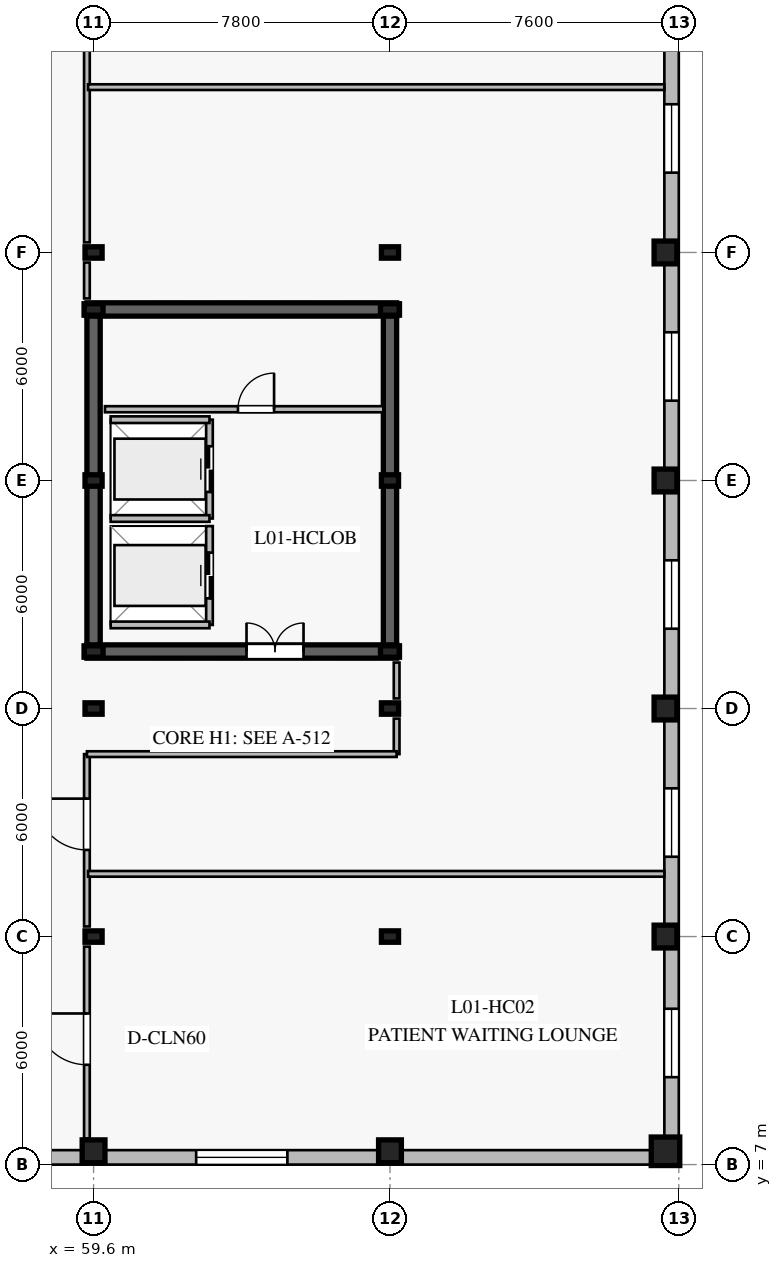
"""IFC4 building model, lengths in metres.
Left out: names, types, materials, properties, quantities, classifications, styles, units other than length and angle.
Written with IfcOpenShell. Run it as: python <this file> out.ifc"""

import sys

from ifc_helpers import new_model, si_unit, direction, frame, frame_2d, origin, origin_2d, place, context, subcontext, project, spatial, rectangle, i_section, extrude, element, fill, save


model = new_model("IFC4")
c1 = context("Model", 3, precision=1e-05, world=origin(), true_north=direction((0.0, 1.0)))
c2 = subcontext(c1, "Body", "Model", "MODEL_VIEW")
j1 = project(units=[si_unit("LENGTHUNIT", "METRE"), si_unit("PLANEANGLEUNIT", "RADIAN")], contexts=[c1])
p1 = place(None, origin())
s1 = spatial("IfcSite", under=j1, at=p1, CompositionType="ELEMENT")
p2 = place(p1, origin())
s2 = spatial("IfcBuilding", under=s1, at=p2, CompositionType="ELEMENT")
p3 = place(p2, frame((0.0, 0.0, 5.2)))
s3 = spatial("IfcBuildingStorey", under=s2, at=p3, CompositionType="ELEMENT", Elevation=5.2)
p4 = place(p3, frame((59.425, 20.5, 0.0), z_axis=(0.0, 0.0, 1.0), x_axis=(1.0, 0.0, 0.0)))
e1 = element("IfcWall", 1, at=p4, inside=s3, PredefinedType="SHEAR", context=c2, shape_type="SweptSolid", body=[
    extrude(rectangle(XDim=8.15, YDim=0.35, at=frame_2d((4.075, 0.0))), origin(), (0.0, 0.0, 1.0), 4.34),
])
p5 = place(p4, frame((4.2, 0.0, 0.0)))
e2 = element("IfcOpeningElement", 2, at=p5, cuts=e1, PredefinedType="OPENING", context=c2, shape_type="SweptSolid", body=[
    extrude(rectangle(XDim=1.5, YDim=2.2, at=frame_2d((0.75, 1.1))), frame((0.0, 0.185, 0.0), z_axis=(0.0, -1.0, 0.0), x_axis=(1.0, 0.0, 0.0)), (0.0, 0.0, 1.0), 0.37),
])
p6 = place(p3, frame((67.575, 29.5, 0.0), z_axis=(0.0, 0.0, 1.0), x_axis=(-1.0, 0.0, 0.0)))
e3 = element("IfcWall", 3, at=p6, inside=s3, PredefinedType="SHEAR", context=c2, shape_type="SweptSolid", body=[
    extrude(rectangle(XDim=8.15, YDim=0.35, at=frame_2d((4.075, 0.0))), origin(), (0.0, 0.0, 1.0), 4.34),
])
for number, where, z_axis, x_axis in (
    (4, (59.6, 29.325, 0.0), (0.0, 0.0, 1.0), (0.0, -1.0, 0.0)),
    (5, (67.4, 20.675, 0.0), (0.0, 0.0, 1.0), (0.0, 1.0, 0.0)),
):
    element("IfcWall", number, at=place(p3, frame(where, z_axis=z_axis, x_axis=x_axis)), inside=s3, PredefinedType="SHEAR", context=c2, shape_type="SweptSolid", body=[
        extrude(rectangle(XDim=8.65, YDim=0.35, at=frame_2d((4.325, 0.0))), origin(), (0.0, 0.0, 1.0), 4.34),
    ])
for number, where, z_axis, x_axis in (
    (6, (59.6, 20.5, 0.0), (0.0, 0.0, 1.0), (1.0, 0.0, 0.0)),
    (7, (67.4, 20.5, 0.0), (0.0, 0.0, 1.0), (1.0, 0.0, 0.0)),
    (8, (67.4, 29.5, 0.0), (0.0, 0.0, 1.0), (1.0, 0.0, 0.0)),
    (9, (59.6, 29.5, 0.0), (0.0, 0.0, 1.0), (1.0, 0.0, 0.0)),
):
    element("IfcColumn", number, at=place(p3, frame(where, z_axis=z_axis, x_axis=x_axis)), inside=s3, PredefinedType="COLUMN", context=c2, shape_type="SweptSolid", body=[
        extrude(i_section(OverallWidth=0.3, OverallDepth=0.5, WebThickness=0.014, FlangeThickness=0.028, at=origin_2d()), origin(), (0.0, 0.0, 1.0), 4.6),
    ])
p7 = place(p3, frame((59.6, 7.35, 0.0), z_axis=(0.0, 0.0, 1.0), x_axis=(1.0, 0.0, 0.0)))
e10 = element("IfcColumn", 10, at=p7, inside=s3, PredefinedType="COLUMN", context=c2, shape_type="SweptSolid", body=[
    extrude(rectangle(XDim=0.6, YDim=0.6, at=origin_2d()), origin(), (0.0, 0.0, 1.0), 4.6),
])
for number, where, z_axis, x_axis in (
    (11, (59.6, 13.0, 0.0), (0.0, 0.0, 1.0), (1.0, 0.0, 0.0)),
    (12, (59.6, 19.0, 0.0), (0.0, 0.0, 1.0), (1.0, 0.0, 0.0)),
    (13, (59.6, 25.0, 0.0), (0.0, 0.0, 1.0), (1.0, 0.0, 0.0)),
    (14, (59.6, 31.0, 0.0), (0.0, 0.0, 1.0), (1.0, 0.0, 0.0)),
):
    element("IfcColumn", number, at=place(p3, frame(where, z_axis=z_axis, x_axis=x_axis)), inside=s3, PredefinedType="COLUMN", context=c2, shape_type="SweptSolid", body=[
        extrude(i_section(OverallWidth=0.3, OverallDepth=0.45, WebThickness=0.014, FlangeThickness=0.026, at=origin_2d()), origin(), (0.0, 0.0, 1.0), 4.6),
    ])
p8 = place(p3, frame((67.4, 7.35, 0.0), z_axis=(0.0, 0.0, 1.0), x_axis=(1.0, 0.0, 0.0)))
e15 = element("IfcColumn", 15, at=p8, inside=s3, PredefinedType="COLUMN", context=c2, shape_type="SweptSolid", body=[
    extrude(rectangle(XDim=0.6, YDim=0.6, at=origin_2d()), origin(), (0.0, 0.0, 1.0), 4.6),
])
for number, where, z_axis, x_axis in (
    (16, (67.4, 13.0, 0.0), (0.0, 0.0, 1.0), (1.0, 0.0, 0.0)),
    (17, (67.4, 19.0, 0.0), (0.0, 0.0, 1.0), (1.0, 0.0, 0.0)),
    (18, (67.4, 25.0, 0.0), (0.0, 0.0, 1.0), (1.0, 0.0, 0.0)),
    (19, (67.4, 31.0, 0.0), (0.0, 0.0, 1.0), (1.0, 0.0, 0.0)),
):
    element("IfcColumn", number, at=place(p3, frame(where, z_axis=z_axis, x_axis=x_axis)), inside=s3, PredefinedType="COLUMN", context=c2, shape_type="SweptSolid", body=[
        extrude(i_section(OverallWidth=0.3, OverallDepth=0.45, WebThickness=0.014, FlangeThickness=0.026, at=origin_2d()), origin(), (0.0, 0.0, 1.0), 4.6),
    ])
p9 = place(p3, frame((74.65, 7.35, 0.0), z_axis=(0.0, 0.0, 1.0), x_axis=(1.0, 0.0, 0.0)))
e20 = element("IfcColumn", 20, at=p9, inside=s3, PredefinedType="COLUMN", context=c2, shape_type="SweptSolid", body=[
    extrude(rectangle(XDim=0.75, YDim=0.75, at=origin_2d()), origin(), (0.0, 0.0, 1.0), 4.6),
])
for number, where, z_axis, x_axis in (
    (21, (74.65, 13.0, 0.0), (0.0, 0.0, 1.0), (1.0, 0.0, 0.0)),
    (22, (74.65, 19.0, 0.0), (0.0, 0.0, 1.0), (1.0, 0.0, 0.0)),
    (23, (74.65, 25.0, 0.0), (0.0, 0.0, 1.0), (1.0, 0.0, 0.0)),
    (24, (74.65, 31.0, 0.0), (0.0, 0.0, 1.0), (1.0, 0.0, 0.0)),
):
    element("IfcColumn", number, at=place(p3, frame(where, z_axis=z_axis, x_axis=x_axis)), inside=s3, PredefinedType="COLUMN", context=c2, shape_type="SweptSolid", body=[
        extrude(rectangle(XDim=0.6, YDim=0.6, at=origin_2d()), origin(), (0.0, 0.0, 1.0), 4.6),
    ])
p10 = place(p3, frame((75.0, 7.19, 0.0), z_axis=(0.0, 0.0, 1.0), x_axis=(-1.0, 0.0, 0.0)))
e25 = element("IfcWall", 25, at=p10, inside=s3, PredefinedType="STANDARD", context=c2, shape_type="SweptSolid", body=[
    extrude(rectangle(XDim=23.0, YDim=0.38, at=frame_2d((11.5, 0.0))), origin(), (0.0, 0.0, 1.0), 4.34),
])
p11 = place(p10, frame((10.3, 0.0, 0.95)))
e26 = element("IfcOpeningElement", 26, at=p11, cuts=e25, PredefinedType="OPENING", context=c2, shape_type="SweptSolid", body=[
    extrude(rectangle(XDim=2.4, YDim=1.8, at=frame_2d((1.2, 0.9))), frame((0.0, 0.2, 0.0), z_axis=(0.0, -1.0, 0.0), x_axis=(1.0, 0.0, 0.0)), (0.0, 0.0, 1.0), 0.4),
])
p12 = place(p3, frame((74.81, 42.62, 0.0), z_axis=(0.0, 0.0, 1.0), x_axis=(0.0, -1.0, 0.0)))
e27 = element("IfcWall", 27, at=p12, inside=s3, PredefinedType="STANDARD", context=c2, shape_type="SweptSolid", body=[
    extrude(rectangle(XDim=35.24, YDim=0.38, at=frame_2d((17.62, 0.0))), origin(), (0.0, 0.0, 1.0), 4.34),
])
p13 = place(p12, frame((31.52, 0.0, 0.9)))
e28 = element("IfcOpeningElement", 28, at=p13, cuts=e27, PredefinedType="OPENING", context=c2, shape_type="SweptSolid", body=[
    extrude(rectangle(XDim=1.8, YDim=1.8, at=frame_2d((0.9, 0.9))), frame((0.0, 0.2, 0.0), z_axis=(0.0, -1.0, 0.0), x_axis=(1.0, 0.0, 0.0)), (0.0, 0.0, 1.0), 0.4),
])
p14 = place(p12, frame((25.72, 0.0, 0.9)))
e29 = element("IfcOpeningElement", 29, at=p14, cuts=e27, PredefinedType="OPENING", context=c2, shape_type="SweptSolid", body=[
    extrude(rectangle(XDim=1.8, YDim=1.8, at=frame_2d((0.9, 0.9))), frame((0.0, 0.2, 0.0), z_axis=(0.0, -1.0, 0.0), x_axis=(1.0, 0.0, 0.0)), (0.0, 0.0, 1.0), 0.4),
])
p15 = place(p12, frame((19.72, 0.0, 0.9)))
e30 = element("IfcOpeningElement", 30, at=p15, cuts=e27, PredefinedType="OPENING", context=c2, shape_type="SweptSolid", body=[
    extrude(rectangle(XDim=1.8, YDim=1.8, at=frame_2d((0.9, 0.9))), frame((0.0, 0.2, 0.0), z_axis=(0.0, -1.0, 0.0), x_axis=(1.0, 0.0, 0.0)), (0.0, 0.0, 1.0), 0.4),
])
p16 = place(p12, frame((13.72, 0.0, 0.9)))
e31 = element("IfcOpeningElement", 31, at=p16, cuts=e27, PredefinedType="OPENING", context=c2, shape_type="SweptSolid", body=[
    extrude(rectangle(XDim=1.8, YDim=1.8, at=frame_2d((0.9, 0.9))), frame((0.0, 0.2, 0.0), z_axis=(0.0, -1.0, 0.0), x_axis=(1.0, 0.0, 0.0)), (0.0, 0.0, 1.0), 0.4),
])
p17 = place(p12, frame((7.72, 0.0, 0.9)))
e32 = element("IfcOpeningElement", 32, at=p17, cuts=e27, PredefinedType="OPENING", context=c2, shape_type="SweptSolid", body=[
    extrude(rectangle(XDim=1.8, YDim=1.8, at=frame_2d((0.9, 0.9))), frame((0.0, 0.2, 0.0), z_axis=(0.0, -1.0, 0.0), x_axis=(1.0, 0.0, 0.0)), (0.0, 0.0, 1.0), 0.4),
])
p18 = place(p12, frame((1.92, 0.0, 0.9)))
e33 = element("IfcOpeningElement", 33, at=p18, cuts=e27, PredefinedType="OPENING", context=c2, shape_type="SweptSolid", body=[
    extrude(rectangle(XDim=1.8, YDim=1.8, at=frame_2d((0.9, 0.9))), frame((0.0, 0.2, 0.0), z_axis=(0.0, -1.0, 0.0), x_axis=(1.0, 0.0, 0.0)), (0.0, 0.0, 1.0), 0.4),
])
p19 = place(p3, frame((62.65, 21.2, 0.0), z_axis=(0.0, 0.0, 1.0), x_axis=(0.0, 1.0, 0.0)))
e34 = element("IfcWall", 34, at=p19, inside=s3, PredefinedType="PARTITIONING", context=c2, shape_type="SweptSolid", body=[
    extrude(rectangle(XDim=2.6, YDim=0.175, at=frame_2d((1.3, 0.0))), origin(), (0.0, 0.0, 1.0), 4.34),
])
p20 = place(p19, frame((0.7, 0.0, 0.0)))
e35 = element("IfcOpeningElement", 35, at=p20, cuts=e34, PredefinedType="OPENING", context=c2, shape_type="SweptSolid", body=[
    extrude(rectangle(XDim=1.2, YDim=2.2, at=frame_2d((0.6, 1.1))), frame((0.0, 0.098, 0.0), z_axis=(0.0, -1.0, 0.0), x_axis=(1.0, 0.0, 0.0)), (0.0, 0.0, 1.0), 0.195),
])
p21 = place(p3, frame((60.05, 21.2, 0.0), z_axis=(0.0, 0.0, 1.0), x_axis=(1.0, 0.0, 0.0)))
e36 = element("IfcWall", 36, at=p21, inside=s3, PredefinedType="PARTITIONING", context=c2, shape_type="SweptSolid", body=[
    extrude(rectangle(XDim=2.6, YDim=0.175, at=frame_2d((1.3, 0.0))), origin(), (0.0, 0.0, 1.0), 4.34),
])
p22 = place(p3, frame((62.65, 24.0, 0.0), z_axis=(0.0, 0.0, 1.0), x_axis=(0.0, 1.0, 0.0)))
e37 = element("IfcWall", 37, at=p22, inside=s3, PredefinedType="PARTITIONING", context=c2, shape_type="SweptSolid", body=[
    extrude(rectangle(XDim=2.6, YDim=0.175, at=frame_2d((1.3, 0.0))), origin(), (0.0, 0.0, 1.0), 3.98),
])
p23 = place(p22, frame((0.7, 0.0, 0.0)))
e38 = element("IfcOpeningElement", 38, at=p23, cuts=e37, PredefinedType="OPENING", context=c2, shape_type="SweptSolid", body=[
    extrude(rectangle(XDim=1.2, YDim=2.2, at=frame_2d((0.6, 1.1))), frame((0.0, 0.098, 0.0), z_axis=(0.0, -1.0, 0.0), x_axis=(1.0, 0.0, 0.0)), (0.0, 0.0, 1.0), 0.195),
])
for number, where, z_axis, x_axis in (
    (39, (60.05, 24.0, 0.0), (0.0, 0.0, 1.0), (1.0, 0.0, 0.0)),
    (40, (60.05, 26.6, 0.0), (0.0, 0.0, 1.0), (1.0, 0.0, 0.0)),
):
    element("IfcWall", number, at=place(p3, frame(where, z_axis=z_axis, x_axis=x_axis)), inside=s3, PredefinedType="PARTITIONING", context=c2, shape_type="SweptSolid", body=[
        extrude(rectangle(XDim=2.6, YDim=0.175, at=frame_2d((1.3, 0.0))), origin(), (0.0, 0.0, 1.0), 4.34),
    ])
p24 = place(p3, frame((59.9, 26.875, 0.0), z_axis=(0.0, 0.0, 1.0), x_axis=(1.0, 0.0, 0.0)))
e41 = element("IfcWall", 41, at=p24, inside=s3, PredefinedType="PLUMBINGWALL", context=c2, shape_type="SweptSolid", body=[
    extrude(rectangle(XDim=7.325, YDim=0.16, at=frame_2d((3.663, 0.0))), origin(), (0.0, 0.0, 1.0), 3.98),
])
p25 = place(p24, frame((3.5, 0.0, 0.0)))
e42 = element("IfcOpeningElement", 42, at=p25, cuts=e41, PredefinedType="OPENING", context=c2, shape_type="SweptSolid", body=[
    extrude(rectangle(XDim=0.95, YDim=2.1, at=frame_2d((0.475, 1.05))), frame((0.0, 0.09, 0.0), z_axis=(0.0, -1.0, 0.0), x_axis=(1.0, 0.0, 0.0)), (0.0, 0.0, 1.0), 0.18),
])
p26 = place(p3, frame((59.425, 7.69, 0.0), z_axis=(0.0, 0.0, 1.0), x_axis=(0.0, 1.0, 0.0)))
e43 = element("IfcWall", 43, at=p26, inside=s3, PredefinedType="PARTITIONING", context=c2, shape_type="SweptSolid", body=[
    extrude(rectangle(XDim=5.045, YDim=0.15, at=frame_2d((2.522, 0.0))), origin(), (0.0, 0.0, 1.0), 3.98),
])
p27 = place(p26, frame((1.936, 0.0, 0.0)))
e44 = element("IfcOpeningElement", 44, at=p27, cuts=e43, PredefinedType="OPENING", context=c2, shape_type="SweptSolid", body=[
    extrude(rectangle(XDim=1.35, YDim=2.2, at=frame_2d((0.675, 1.1))), frame((0.0, 0.085, 0.0), z_axis=(0.0, -1.0, 0.0), x_axis=(1.0, 0.0, 0.0)), (0.0, 0.0, 1.0), 0.17),
])
p28 = place(p3, frame((59.425, 13.265, 0.0), z_axis=(0.0, 0.0, 1.0), x_axis=(0.0, 1.0, 0.0)))
e45 = element("IfcWall", 45, at=p28, inside=s3, PredefinedType="PARTITIONING", context=c2, shape_type="SweptSolid", body=[
    extrude(rectangle(XDim=4.535, YDim=0.15, at=frame_2d((2.268, 0.0))), origin(), (0.0, 0.0, 1.0), 3.98),
])
p29 = place(p28, frame((2.014, 0.0, 0.0)))
e46 = element("IfcOpeningElement", 46, at=p29, cuts=e45, PredefinedType="OPENING", context=c2, shape_type="SweptSolid", body=[
    extrude(rectangle(XDim=1.35, YDim=2.2, at=frame_2d((0.675, 1.1))), frame((0.0, 0.085, 0.0), z_axis=(0.0, -1.0, 0.0), x_axis=(1.0, 0.0, 0.0)), (0.0, 0.0, 1.0), 0.17),
])
p30 = place(p3, frame((59.425, 29.79, 0.0), z_axis=(0.0, 0.0, 1.0), x_axis=(0.0, 1.0, 0.0)))
e47 = element("IfcWall", 47, at=p30, inside=s3, PredefinedType="PARTITIONING", context=c2, shape_type="SweptSolid", body=[
    extrude(rectangle(XDim=0.945, YDim=0.15, at=frame_2d((0.473, 0.0))), origin(), (0.0, 0.0, 1.0), 3.98),
])
p31 = place(p3, frame((59.425, 31.265, 0.0), z_axis=(0.0, 0.0, 1.0), x_axis=(0.0, 1.0, 0.0)))
e48 = element("IfcWall", 48, at=p31, inside=s3, PredefinedType="PARTITIONING", context=c2, shape_type="SweptSolid", body=[
    extrude(rectangle(XDim=5.47, YDim=0.15, at=frame_2d((2.735, 0.0))), origin(), (0.0, 0.0, 1.0), 3.98),
])
p32 = place(p3, frame((67.575, 17.8, 0.0), z_axis=(0.0, 0.0, 1.0), x_axis=(0.0, 1.0, 0.0)))
e49 = element("IfcWall", 49, at=p32, inside=s3, PredefinedType="PARTITIONING", context=c2, shape_type="SweptSolid", body=[
    extrude(rectangle(XDim=0.935, YDim=0.15, at=frame_2d((0.468, 0.0))), origin(), (0.0, 0.0, 1.0), 3.98),
])
p33 = place(p3, frame((67.575, 19.265, 0.0), z_axis=(0.0, 0.0, 1.0), x_axis=(0.0, 1.0, 0.0)))
e50 = element("IfcWall", 50, at=p33, inside=s3, PredefinedType="PARTITIONING", context=c2, shape_type="SweptSolid", body=[
    extrude(rectangle(XDim=0.945, YDim=0.15, at=frame_2d((0.473, 0.0))), origin(), (0.0, 0.0, 1.0), 3.98),
])
p34 = place(p3, frame((59.425, 17.8, 0.0), z_axis=(0.0, 0.0, 1.0), x_axis=(1.0, 0.0, 0.0)))
e51 = element("IfcWall", 51, at=p34, inside=s3, PredefinedType="PARTITIONING", context=c2, shape_type="SweptSolid", body=[
    extrude(rectangle(XDim=8.15, YDim=0.15, at=frame_2d((4.075, 0.0))), origin(), (0.0, 0.0, 1.0), 3.98),
])
for number, where, z_axis, x_axis in (
    (52, (59.455, 14.65, 0.0), (0.0, 0.0, 1.0), (1.0, 0.0, 0.0)),
    (53, (59.455, 35.35, 0.0), (0.0, 0.0, 1.0), (1.0, 0.0, 0.0)),
):
    element("IfcWall", number, at=place(p3, frame(where, z_axis=z_axis, x_axis=x_axis)), inside=s3, PredefinedType="PARTITIONING", context=c2, shape_type="SweptSolid", body=[
        extrude(rectangle(XDim=15.165, YDim=0.15, at=frame_2d((7.583, 0.0))), origin(), (0.0, 0.0, 1.0), 3.98),
    ])
p35 = place(p13, origin())
e54 = element("IfcWindow", 54, at=p35, inside=s3, PartitioningType="DOUBLE_PANEL_VERTICAL", PredefinedType="WINDOW", context=c2, shape_type="SweptSolid", body=[
    extrude(rectangle(XDim=1.8, YDim=1.8, at=frame_2d((0.9, 0.9))), frame((0.0, 0.03, 0.0), z_axis=(0.0, -1.0, 0.0), x_axis=(1.0, 0.0, 0.0)), (0.0, 0.0, 1.0), 0.06),
])
fill(e28, e54)
p36 = place(p14, origin())
e55 = element("IfcWindow", 55, at=p36, inside=s3, PartitioningType="DOUBLE_PANEL_VERTICAL", PredefinedType="WINDOW", context=c2, shape_type="SweptSolid", body=[
    extrude(rectangle(XDim=1.8, YDim=1.8, at=frame_2d((0.9, 0.9))), frame((0.0, 0.03, 0.0), z_axis=(0.0, -1.0, 0.0), x_axis=(1.0, 0.0, 0.0)), (0.0, 0.0, 1.0), 0.06),
])
fill(e29, e55)
p37 = place(p15, origin())
e56 = element("IfcWindow", 56, at=p37, inside=s3, PartitioningType="DOUBLE_PANEL_VERTICAL", PredefinedType="WINDOW", context=c2, shape_type="SweptSolid", body=[
    extrude(rectangle(XDim=1.8, YDim=1.8, at=frame_2d((0.9, 0.9))), frame((0.0, 0.03, 0.0), z_axis=(0.0, -1.0, 0.0), x_axis=(1.0, 0.0, 0.0)), (0.0, 0.0, 1.0), 0.06),
])
fill(e30, e56)
p38 = place(p16, origin())
e57 = element("IfcWindow", 57, at=p38, inside=s3, PartitioningType="DOUBLE_PANEL_VERTICAL", PredefinedType="WINDOW", context=c2, shape_type="SweptSolid", body=[
    extrude(rectangle(XDim=1.8, YDim=1.8, at=frame_2d((0.9, 0.9))), frame((0.0, 0.03, 0.0), z_axis=(0.0, -1.0, 0.0), x_axis=(1.0, 0.0, 0.0)), (0.0, 0.0, 1.0), 0.06),
])
fill(e31, e57)
p39 = place(p17, origin())
e58 = element("IfcWindow", 58, at=p39, inside=s3, PartitioningType="DOUBLE_PANEL_VERTICAL", PredefinedType="WINDOW", context=c2, shape_type="SweptSolid", body=[
    extrude(rectangle(XDim=1.8, YDim=1.8, at=frame_2d((0.9, 0.9))), frame((0.0, 0.03, 0.0), z_axis=(0.0, -1.0, 0.0), x_axis=(1.0, 0.0, 0.0)), (0.0, 0.0, 1.0), 0.06),
])
fill(e32, e58)
p40 = place(p11, origin())
e59 = element("IfcWindow", 59, at=p40, inside=s3, PartitioningType="TRIPLE_PANEL_VERTICAL", PredefinedType="WINDOW", context=c2, shape_type="SweptSolid", body=[
    extrude(rectangle(XDim=2.4, YDim=1.8, at=frame_2d((1.2, 0.9))), frame((0.0, 0.03, 0.0), z_axis=(0.0, -1.0, 0.0), x_axis=(1.0, 0.0, 0.0)), (0.0, 0.0, 1.0), 0.06),
])
fill(e26, e59)
p41 = place(p20, origin())
e60 = element("IfcDoor", 60, at=p41, inside=s3, OperationType="DOUBLE_DOOR_SLIDING", PredefinedType="DOOR", context=c2, shape_type="SweptSolid", body=[
    extrude(rectangle(XDim=1.2, YDim=2.2, at=frame_2d((0.6, 1.1))), frame((0.0, 0.025, 0.0), z_axis=(0.0, -1.0, 0.0), x_axis=(1.0, 0.0, 0.0)), (0.0, 0.0, 1.0), 0.05),
])
fill(e35, e60)
p42 = place(p23, origin())
e61 = element("IfcDoor", 61, at=p42, inside=s3, OperationType="DOUBLE_DOOR_SLIDING", PredefinedType="DOOR", context=c2, shape_type="SweptSolid", body=[
    extrude(rectangle(XDim=1.2, YDim=2.2, at=frame_2d((0.6, 1.1))), frame((0.0, 0.025, 0.0), z_axis=(0.0, -1.0, 0.0), x_axis=(1.0, 0.0, 0.0)), (0.0, 0.0, 1.0), 0.05),
])
fill(e38, e61)
p43 = place(p5, origin())
e62 = element("IfcDoor", 62, at=p43, inside=s3, OperationType="DOUBLE_DOOR_SINGLE_SWING", PredefinedType="DOOR", context=c2, shape_type="SweptSolid", body=[
    extrude(rectangle(XDim=1.5, YDim=2.2, at=frame_2d((0.75, 1.1))), frame((0.0, 0.025, 0.0), z_axis=(0.0, -1.0, 0.0), x_axis=(1.0, 0.0, 0.0)), (0.0, 0.0, 1.0), 0.05),
])
fill(e2, e62)
p44 = place(p25, origin())
e63 = element("IfcDoor", 63, at=p44, inside=s3, OperationType="SINGLE_SWING_RIGHT", PredefinedType="DOOR", context=c2, shape_type="SweptSolid", body=[
    extrude(rectangle(XDim=0.95, YDim=2.1, at=frame_2d((0.475, 1.05))), frame((0.0, 0.025, 0.0), z_axis=(0.0, -1.0, 0.0), x_axis=(1.0, 0.0, 0.0)), (0.0, 0.0, 1.0), 0.05),
])
fill(e42, e63)
p45 = place(p27, origin())
e64 = element("IfcDoor", 64, at=p45, inside=s3, OperationType="SINGLE_SWING_RIGHT", PredefinedType="DOOR", context=c2, shape_type="SweptSolid", body=[
    extrude(rectangle(XDim=1.35, YDim=2.2, at=frame_2d((0.675, 1.1))), frame((0.0, 0.025, 0.0), z_axis=(0.0, -1.0, 0.0), x_axis=(1.0, 0.0, 0.0)), (0.0, 0.0, 1.0), 0.05),
])
fill(e44, e64)
p46 = place(p29, origin())
e65 = element("IfcDoor", 65, at=p46, inside=s3, OperationType="SINGLE_SWING_RIGHT", PredefinedType="DOOR", context=c2, shape_type="SweptSolid", body=[
    extrude(rectangle(XDim=1.35, YDim=2.2, at=frame_2d((0.675, 1.1))), frame((0.0, 0.025, 0.0), z_axis=(0.0, -1.0, 0.0), x_axis=(1.0, 0.0, 0.0)), (0.0, 0.0, 1.0), 0.05),
])
fill(e46, e65)
save(model, sys.argv[1])
